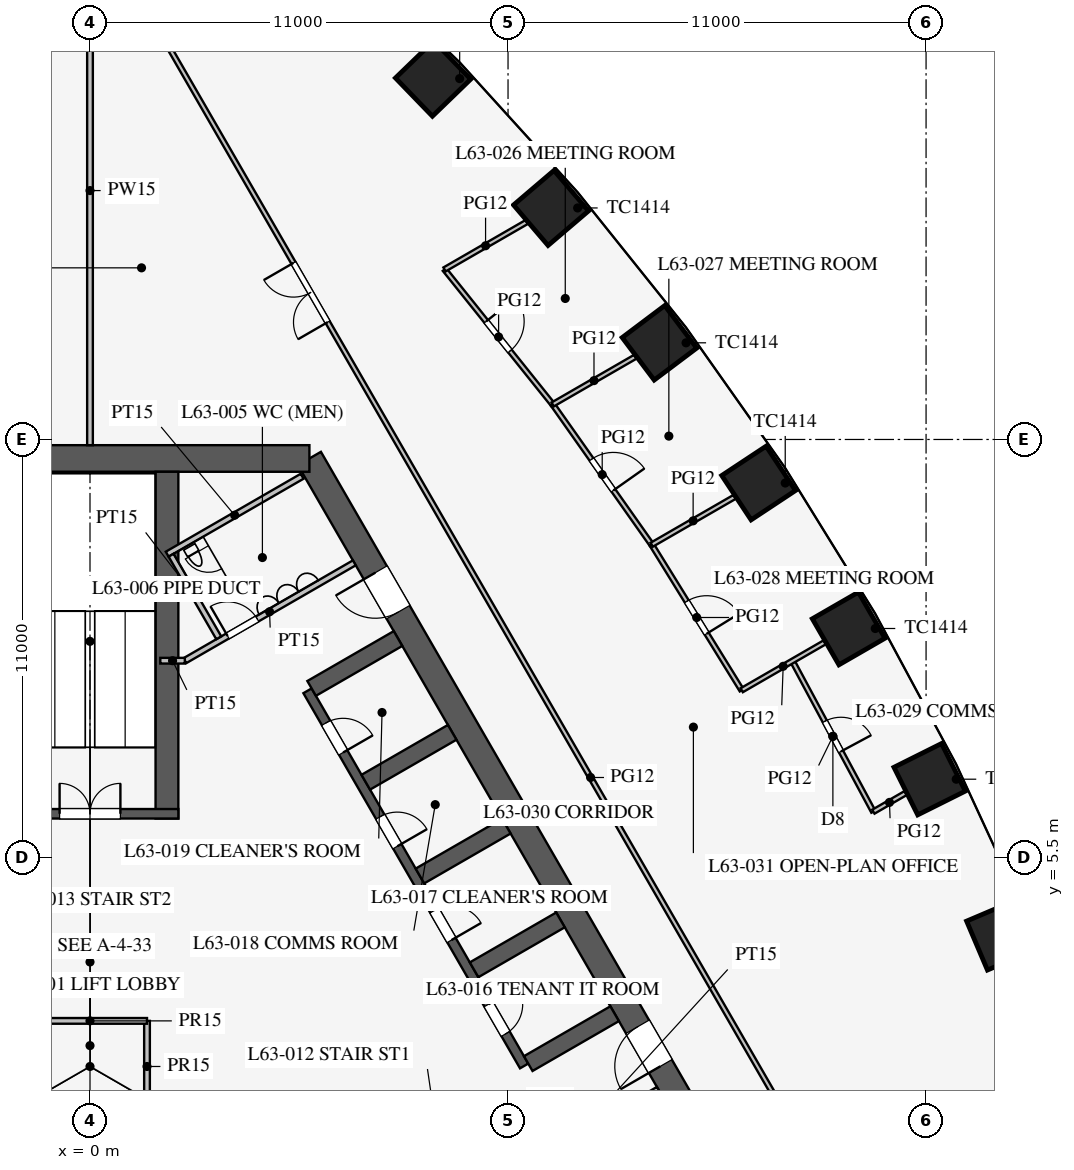
"""IFC4 building model, lengths in metres.
Left out: names, types, materials, properties, quantities, classifications, styles, units other than length and angle.
Written with IfcOpenShell. Run it as: python <this file> out.ifc"""

import sys

from ifc_helpers import new_model, si_unit, direction, frame, frame_2d, origin, origin_2d, place, context, subcontext, project, spatial, rectangle, extrude, element, fill, save


model = new_model("IFC4")
c1 = context("Model", 3, precision=1e-05, world=origin(), true_north=direction((0.0, 1.0)))
c2 = subcontext(c1, "Body", "Model", "MODEL_VIEW")
j1 = project(units=[si_unit("LENGTHUNIT", "METRE"), si_unit("PLANEANGLEUNIT", "RADIAN")], contexts=[c1])
p1 = place(None, origin())
s1 = spatial("IfcSite", under=j1, at=p1, CompositionType="ELEMENT")
p2 = place(p1, origin())
s2 = spatial("IfcBuilding", under=s1, at=p2, CompositionType="ELEMENT")
p3 = place(p2, frame((0.0, 0.0, 276.3)))
s3 = spatial("IfcBuildingStorey", under=s2, at=p3, CompositionType="ELEMENT", Elevation=276.3)
for number, where, z_axis, x_axis in (
    (1, (23.985, 3.455, 0.0), (0.0, 0.0, 1.0), (-0.391, 0.92, 0.0)),
    (2, (22.094, 7.56, 0.0), (0.0, 0.0, 1.0), (-0.447, 0.895, 0.0)),
    (3, (19.963, 11.526, 0.0), (0.0, 0.0, 1.0), (-0.5, 0.866, 0.0)),
    (4, (17.594, 15.354, 0.0), (0.0, 0.0, 1.0), (-0.552, 0.834, 0.0)),
    (5, (14.985, 19.044, 0.0), (0.0, 0.0, 1.0), (-0.601, 0.799, 0.0)),
    (6, (12.132, 22.593, 0.0), (0.0, 0.0, 1.0), (-0.649, 0.761, 0.0)),
    (7, (9.027, 25.997, 0.0), (0.0, 0.0, 1.0), (-0.695, 0.719, 0.0)),
):
    element("IfcColumn", number, at=place(p3, frame(where, z_axis=z_axis, x_axis=x_axis)), inside=s3, PredefinedType="COLUMN", context=c2, shape_type="SweptSolid", body=[
        extrude(rectangle(XDim=1.4, YDim=1.4, at=origin_2d()), origin(), (0.0, 0.0, 1.0), 4.2),
    ])
p4 = place(p3, frame((16.743, -3.0, 0.0), z_axis=(0.0, 0.0, 1.0), x_axis=(-0.500002442456, 0.866023993627, 0.0)))
e8 = element("IfcWall", 8, at=p4, inside=s3, PredefinedType="SHEAR", context=c2, shape_type="SweptSolid", body=[
    extrude(rectangle(XDim=21.939, YDim=0.7, at=frame_2d((10.97, 0.0))), origin(), (0.0, 0.0, 1.0), 4.2),
])
p5 = place(p4, frame((17.27, 0.0, 0.0)))
e9 = element("IfcOpeningElement", 9, at=p5, cuts=e8, PredefinedType="OPENING", context=c2, shape_type="SweptSolid", body=[
    extrude(rectangle(XDim=1.2, YDim=2.1, at=frame_2d((0.6, 1.05))), frame((0.0, 0.36, 0.0), z_axis=(0.0, -1.0, 0.0), x_axis=(1.0, 0.0, 0.0)), (0.0, 0.0, 1.0), 0.72),
])
p6 = place(p4, frame((3.47, 0.0, 0.0)))
e10 = element("IfcOpeningElement", 10, at=p6, cuts=e8, PredefinedType="OPENING", context=c2, shape_type="SweptSolid", body=[
    extrude(rectangle(XDim=1.2, YDim=2.1, at=frame_2d((0.6, 1.05))), frame((0.0, 0.36, 0.0), z_axis=(0.0, -1.0, 0.0), x_axis=(1.0, 0.0, 0.0)), (0.0, 0.0, 1.0), 0.72),
])
p7 = place(p3, frame((5.773, 16.0, 0.0), z_axis=(0.0, 0.0, 1.0), x_axis=(-1.0, 0.0, 0.0)))
e11 = element("IfcWall", 11, at=p7, inside=s3, PredefinedType="SHEAR", context=c2, shape_type="SweptSolid", body=[
    extrude(rectangle(XDim=11.547, YDim=0.7, at=frame_2d((5.773, 0.0))), origin(), (0.0, 0.0, 1.0), 4.2),
])
p8 = place(p3, frame((11.424, 0.014, 0.0), z_axis=(0.0, 0.0, 1.0), x_axis=(-0.500001763848, 0.866024385424, 0.0)))
e12 = element("IfcWall", 12, at=p8, inside=s3, PredefinedType="SHEAR", context=c2, shape_type="SweptSolid", body=[
    extrude(rectangle(XDim=11.4, YDim=0.25, at=frame_2d((5.7, 0.0))), origin(), (0.0, 0.0, 1.0), 4.2),
])
p9 = place(p8, frame((0.975, 0.0, 0.0)))
e13 = element("IfcOpeningElement", 13, at=p9, cuts=e12, PredefinedType="OPENING", context=c2, shape_type="SweptSolid", body=[
    extrude(rectangle(XDim=0.9, YDim=2.1, at=frame_2d((0.45, 1.05))), frame((0.0, 0.135, 0.0), z_axis=(0.0, -1.0, 0.0), x_axis=(1.0, 0.0, 0.0)), (0.0, 0.0, 1.0), 0.27),
])
p10 = place(p8, frame((3.825, 0.0, 0.0)))
e14 = element("IfcOpeningElement", 14, at=p10, cuts=e12, PredefinedType="OPENING", context=c2, shape_type="SweptSolid", body=[
    extrude(rectangle(XDim=0.9, YDim=2.1, at=frame_2d((0.45, 1.05))), frame((0.0, 0.135, 0.0), z_axis=(0.0, -1.0, 0.0), x_axis=(1.0, 0.0, 0.0)), (0.0, 0.0, 1.0), 0.27),
])
p11 = place(p8, frame((6.675, 0.0, 0.0)))
e15 = element("IfcOpeningElement", 15, at=p11, cuts=e12, PredefinedType="OPENING", context=c2, shape_type="SweptSolid", body=[
    extrude(rectangle(XDim=0.9, YDim=2.1, at=frame_2d((0.45, 1.05))), frame((0.0, 0.135, 0.0), z_axis=(0.0, -1.0, 0.0), x_axis=(1.0, 0.0, 0.0)), (0.0, 0.0, 1.0), 0.27),
])
p12 = place(p8, frame((9.525, 0.0, 0.0)))
e16 = element("IfcOpeningElement", 16, at=p12, cuts=e12, PredefinedType="OPENING", context=c2, shape_type="SweptSolid", body=[
    extrude(rectangle(XDim=0.9, YDim=2.1, at=frame_2d((0.45, 1.05))), frame((0.0, 0.135, 0.0), z_axis=(0.0, -1.0, 0.0), x_axis=(1.0, 0.0, 0.0)), (0.0, 0.0, 1.0), 0.27),
])
for number, where, z_axis, x_axis in (
    (17, (11.532, 0.076, 0.0), (0.0, 0.0, 1.0), (0.866, 0.5, 0.0)),
    (18, (10.107, 2.544, 0.0), (0.0, 0.0, 1.0), (0.866, 0.5, 0.0)),
    (19, (8.682, 5.012, 0.0), (0.0, 0.0, 1.0), (0.866, 0.5, 0.0)),
    (20, (7.257, 7.481, 0.0), (0.0, 0.0, 1.0), (0.866, 0.5, 0.0)),
    (21, (5.832, 9.949, 0.0), (0.0, 0.0, 1.0), (0.866, 0.5, 0.0)),
):
    element("IfcWall", number, at=place(p3, frame(where, z_axis=z_axis, x_axis=x_axis)), inside=s3, PredefinedType="SHEAR", context=c2, shape_type="SweptSolid", body=[
        extrude(rectangle(XDim=2.625, YDim=0.45, at=frame_2d((1.312, 0.0))), origin(), (0.0, 0.0, 1.0), 4.2),
    ])
p13 = place(p3, frame((2.025, 6.525, 0.0), z_axis=(0.0, 0.0, 1.0), x_axis=(0.0, 1.0, 0.0)))
e22 = element("IfcWall", 22, at=p13, inside=s3, PredefinedType="SHEAR", context=c2, shape_type="SweptSolid", body=[
    extrude(rectangle(XDim=9.125, YDim=0.6, at=frame_2d((4.562, 0.0))), origin(), (0.0, 0.0, 1.0), 4.2),
])
p14 = place(p3, frame((2.325, 6.65, 0.0), z_axis=(0.0, 0.0, 1.0), x_axis=(-1.0, 0.0, 0.0)))
e23 = element("IfcWall", 23, at=p14, inside=s3, PredefinedType="SHEAR", context=c2, shape_type="SweptSolid", body=[
    extrude(rectangle(XDim=4.65, YDim=0.25, at=frame_2d((2.325, 0.0))), origin(), (0.0, 0.0, 1.0), 4.2),
])
p15 = place(p14, frame((1.525, 0.0, 0.0)))
e24 = element("IfcOpeningElement", 24, at=p15, cuts=e23, PredefinedType="OPENING", context=c2, shape_type="SweptSolid", body=[
    extrude(rectangle(XDim=1.6, YDim=2.1, at=frame_2d((0.8, 1.05))), frame((0.0, 0.135, 0.0), z_axis=(0.0, -1.0, 0.0), x_axis=(1.0, 0.0, 0.0)), (0.0, 0.0, 1.0), 0.27),
])
p16 = place(p3, frame((2.495, 10.678, 0.0), z_axis=(0.0, 0.0, 1.0), x_axis=(0.866037967349, 0.499978238636, 0.0)))
e25 = element("IfcWall", 25, at=p16, inside=s3, PredefinedType="PARTITIONING", context=c2, shape_type="SweptSolid", body=[
    extrude(rectangle(XDim=5.15, YDim=0.15, at=frame_2d((2.575, 0.0))), origin(), (0.0, 0.0, 1.0), 4.0),
])
p17 = place(p16, frame((1.3, 0.0, 0.0)))
e26 = element("IfcOpeningElement", 26, at=p17, cuts=e25, PredefinedType="OPENING", context=c2, shape_type="SweptSolid", body=[
    extrude(rectangle(XDim=0.9, YDim=2.1, at=frame_2d((0.45, 1.05))), frame((0.0, 0.085, 0.0), z_axis=(0.0, -1.0, 0.0), x_axis=(1.0, 0.0, 0.0)), (0.0, 0.0, 1.0), 0.17),
])
p18 = place(p3, frame((10.495, -3.178, 0.0), z_axis=(0.0, 0.0, 1.0), x_axis=(0.866037967349, 0.499978238636, 0.0)))
e27 = element("IfcWall", 27, at=p18, inside=s3, PredefinedType="PARTITIONING", context=c2, shape_type="SweptSolid", body=[
    extrude(rectangle(XDim=5.15, YDim=0.15, at=frame_2d((2.575, 0.0))), origin(), (0.0, 0.0, 1.0), 4.0),
])
p19 = place(p18, frame((2.6, 0.0, 0.0)))
e28 = element("IfcOpeningElement", 28, at=p19, cuts=e27, PredefinedType="OPENING", context=c2, shape_type="SweptSolid", body=[
    extrude(rectangle(XDim=0.9, YDim=2.1, at=frame_2d((0.45, 1.05))), frame((0.0, 0.085, 0.0), z_axis=(0.0, -1.0, 0.0), x_axis=(1.0, 0.0, 0.0)), (0.0, 0.0, 1.0), 0.17),
])
p20 = place(p3, frame((2.495, 10.678, 0.0), z_axis=(0.0, 0.0, 1.0), x_axis=(-1.0, 0.0, 0.0)))
e29 = element("IfcWall", 29, at=p20, inside=s3, PredefinedType="PARTITIONING", context=c2, shape_type="SweptSolid", body=[
    extrude(rectangle(XDim=0.645, YDim=0.15, at=frame_2d((0.323, 0.0))), origin(), (0.0, 0.0, 1.0), 4.0),
])
p21 = place(p3, frame((2.031, 13.482, 0.0), z_axis=(0.0, 0.0, 1.0), x_axis=(0.866050731258, 0.499956128963, 0.0)))
e30 = element("IfcWall", 30, at=p21, inside=s3, PredefinedType="PARTITIONING", context=c2, shape_type="SweptSolid", body=[
    extrude(rectangle(XDim=4.1, YDim=0.15, at=frame_2d((2.05, 0.0))), origin(), (0.0, 0.0, 1.0), 4.0),
])
p22 = place(p3, frame((3.389, 11.281, 0.0), z_axis=(0.0, 0.0, 1.0), x_axis=(-0.499989096993, 0.866031698547, 0.0)))
e31 = element("IfcWall", 31, at=p22, inside=s3, PredefinedType="PARTITIONING", context=c2, shape_type="SweptSolid", body=[
    extrude(rectangle(XDim=2.51, YDim=0.15, at=frame_2d((1.255, 0.0))), origin(), (0.0, 0.0, 1.0), 4.0),
])
p23 = place(p3, frame((1.5, -1.2, 0.0), z_axis=(0.0, 0.0, 1.0), x_axis=(0.0, 1.0, 0.0)))
e32 = element("IfcWall", 32, at=p23, inside=s3, PredefinedType="PARTITIONING", context=c2, shape_type="SweptSolid", body=[
    extrude(rectangle(XDim=2.4, YDim=0.15, at=frame_2d((1.2, 0.0))), origin(), (0.0, 0.0, 1.0), 4.0),
])
p24 = place(p3, frame((1.5, 1.2, 0.0), z_axis=(0.0, 0.0, 1.0), x_axis=(-1.0, 0.0, 0.0)))
e33 = element("IfcWall", 33, at=p24, inside=s3, PredefinedType="PARTITIONING", context=c2, shape_type="SweptSolid", body=[
    extrude(rectangle(XDim=3.0, YDim=0.15, at=frame_2d((1.5, 0.0))), origin(), (0.0, 0.0, 1.0), 4.0),
])
p25 = place(p3, frame((0.0, 16.35, 0.0), z_axis=(0.0, 0.0, 1.0), x_axis=(0.0, 1.0, 0.0)))
e34 = element("IfcWall", 34, at=p25, inside=s3, PredefinedType="PARTITIONING", context=c2, shape_type="SweptSolid", body=[
    extrude(rectangle(XDim=13.4, YDim=0.15, at=frame_2d((6.7, 0.0))), origin(), (0.0, 0.0, 1.0), 2.5),
])
p26 = place(p3, frame((25.854, -14.361, 0.0), z_axis=(0.0, 0.0, 1.0), x_axis=(-0.499999496503, 0.866025694478, 0.0)))
e35 = element("IfcWall", 35, at=p26, inside=s3, PredefinedType="PARTITIONING", context=c2, shape_type="SweptSolid", body=[
    extrude(rectangle(XDim=50.728, YDim=0.12, at=frame_2d((25.364, 0.0))), origin(), (0.0, 0.0, 1.0), 2.9),
])
p27 = place(p26, frame((9.75, 0.0, 0.15)))
e36 = element("IfcOpeningElement", 36, at=p27, cuts=e35, PredefinedType="OPENING", context=c2, shape_type="SweptSolid", body=[
    extrude(rectangle(XDim=1.8, YDim=2.1, at=frame_2d((0.9, 1.05))), frame((0.0, 0.07, 0.0), z_axis=(0.0, -1.0, 0.0), x_axis=(1.0, 0.0, 0.0)), (0.0, 0.0, 1.0), 0.14),
])
p28 = place(p26, frame((39.2, 0.0, 0.15)))
e37 = element("IfcOpeningElement", 37, at=p28, cuts=e35, PredefinedType="OPENING", context=c2, shape_type="SweptSolid", body=[
    extrude(rectangle(XDim=1.8, YDim=2.1, at=frame_2d((0.9, 1.05))), frame((0.0, 0.07, 0.0), z_axis=(0.0, -1.0, 0.0), x_axis=(1.0, 0.0, 0.0)), (0.0, 0.0, 1.0), 0.14),
])
p29 = place(p3, frame((17.149, 9.901, 0.0), z_axis=(0.0, 0.0, 1.0), x_axis=(-0.525981173851, 0.850496210899, 0.0)))
e38 = element("IfcWall", 38, at=p29, inside=s3, PredefinedType="PARTITIONING", context=c2, shape_type="SweptSolid", body=[
    extrude(rectangle(XDim=4.502, YDim=0.12, at=frame_2d((2.251, 0.0))), origin(), (0.0, 0.0, 1.0), 2.9),
])
p30 = place(p29, frame((1.75, 0.0, 0.15)))
e39 = element("IfcOpeningElement", 39, at=p30, cuts=e38, PredefinedType="OPENING", context=c2, shape_type="SweptSolid", body=[
    extrude(rectangle(XDim=1.0, YDim=2.1, at=frame_2d((0.5, 1.05))), frame((0.0, 0.07, 0.0), z_axis=(0.0, -1.0, 0.0), x_axis=(1.0, 0.0, 0.0)), (0.0, 0.0, 1.0), 0.14),
])
p31 = place(p3, frame((14.781, 13.73, 0.0), z_axis=(0.0, 0.0, 1.0), x_axis=(-0.576572893039, 0.817045714151, 0.0)))
e40 = element("IfcWall", 40, at=p31, inside=s3, PredefinedType="PARTITIONING", context=c2, shape_type="SweptSolid", body=[
    extrude(rectangle(XDim=4.519, YDim=0.12, at=frame_2d((2.259, 0.0))), origin(), (0.0, 0.0, 1.0), 2.9),
])
p32 = place(p31, frame((1.75, 0.0, 0.15)))
e41 = element("IfcOpeningElement", 41, at=p32, cuts=e40, PredefinedType="OPENING", context=c2, shape_type="SweptSolid", body=[
    extrude(rectangle(XDim=1.0, YDim=2.1, at=frame_2d((0.5, 1.05))), frame((0.0, 0.07, 0.0), z_axis=(0.0, -1.0, 0.0), x_axis=(1.0, 0.0, 0.0)), (0.0, 0.0, 1.0), 0.14),
])
p33 = place(p3, frame((12.175, 17.422, 0.0), z_axis=(0.0, 0.0, 1.0), x_axis=(-0.625290045305, 0.780392439252, 0.0)))
e42 = element("IfcWall", 42, at=p33, inside=s3, PredefinedType="PARTITIONING", context=c2, shape_type="SweptSolid", body=[
    extrude(rectangle(XDim=4.552, YDim=0.12, at=frame_2d((2.276, 0.0))), origin(), (0.0, 0.0, 1.0), 2.9),
])
p34 = place(p33, frame((1.8, 0.0, 0.15)))
e43 = element("IfcOpeningElement", 43, at=p34, cuts=e42, PredefinedType="OPENING", context=c2, shape_type="SweptSolid", body=[
    extrude(rectangle(XDim=1.0, YDim=2.1, at=frame_2d((0.5, 1.05))), frame((0.0, 0.07, 0.0), z_axis=(0.0, -1.0, 0.0), x_axis=(1.0, 0.0, 0.0)), (0.0, 0.0, 1.0), 0.14),
])
p35 = place(p3, frame((20.614, 6.705, 0.0), z_axis=(0.0, 0.0, 1.0), x_axis=(-0.473566170147, 0.880758242932, 0.0)))
e44 = element("IfcWall", 44, at=p35, inside=s3, PredefinedType="PARTITIONING", context=c2, shape_type="SweptSolid", body=[
    extrude(rectangle(XDim=4.502, YDim=0.12, at=frame_2d((2.251, 0.0))), origin(), (0.0, 0.0, 1.0), 2.9),
])
p36 = place(p35, frame((1.8, 0.0, 0.15)))
e45 = element("IfcOpeningElement", 45, at=p36, cuts=e44, PredefinedType="OPENING", context=c2, shape_type="SweptSolid", body=[
    extrude(rectangle(XDim=0.9, YDim=2.1, at=frame_2d((0.45, 1.05))), frame((0.0, 0.07, 0.0), z_axis=(0.0, -1.0, 0.0), x_axis=(1.0, 0.0, 0.0)), (0.0, 0.0, 1.0), 0.14),
])
p37 = place(p3, frame((17.149, 9.901, 0.0), z_axis=(0.0, 0.0, 1.0), x_axis=(0.866022637375, 0.500004791531, 0.0)))
e46 = element("IfcWall", 46, at=p37, inside=s3, PredefinedType="PARTITIONING", context=c2, shape_type="SweptSolid", body=[
    extrude(rectangle(XDim=2.52, YDim=0.12, at=frame_2d((1.26, 0.0))), origin(), (0.0, 0.0, 1.0), 2.6),
])
p38 = place(p3, frame((9.329, 20.974, 0.0), z_axis=(0.0, 0.0, 1.0), x_axis=(0.865999769722, 0.50004439687, 0.0)))
e47 = element("IfcWall", 47, at=p38, inside=s3, PredefinedType="PARTITIONING", context=c2, shape_type="SweptSolid", body=[
    extrude(rectangle(XDim=2.494, YDim=0.12, at=frame_2d((1.247, 0.0))), origin(), (0.0, 0.0, 1.0), 2.4),
])
p39 = place(p3, frame((14.781, 13.73, 0.0), z_axis=(0.0, 0.0, 1.0), x_axis=(0.866032146685, 0.499988320771, 0.0)))
e48 = element("IfcWall", 48, at=p39, inside=s3, PredefinedType="PARTITIONING", context=c2, shape_type="SweptSolid", body=[
    extrude(rectangle(XDim=2.517, YDim=0.12, at=frame_2d((1.259, 0.0))), origin(), (0.0, 0.0, 1.0), 2.6),
])
p40 = place(p3, frame((12.175, 17.422, 0.0), z_axis=(0.0, 0.0, 1.0), x_axis=(0.866085123457, 0.499896548224, 0.0)))
e49 = element("IfcWall", 49, at=p40, inside=s3, PredefinedType="PARTITIONING", context=c2, shape_type="SweptSolid", body=[
    extrude(rectangle(XDim=2.509, YDim=0.12, at=frame_2d((1.254, 0.0))), origin(), (0.0, 0.0, 1.0), 2.6),
])
p41 = place(p3, frame((20.614, 6.705, 0.0), z_axis=(0.0, 0.0, 1.0), x_axis=(0.866069217599, 0.499924104568, 0.0)))
e50 = element("IfcWall", 50, at=p41, inside=s3, PredefinedType="PARTITIONING", context=c2, shape_type="SweptSolid", body=[
    extrude(rectangle(XDim=0.978, YDim=0.12, at=frame_2d((0.489, 0.0))), origin(), (0.0, 0.0, 1.0), 2.6),
])
p42 = place(p17, origin())
e51 = element("IfcDoor", 51, at=p42, inside=s3, OperationType="SINGLE_SWING_LEFT", PredefinedType="DOOR", context=c2, shape_type="SweptSolid", body=[
    extrude(rectangle(XDim=0.9, YDim=2.1, at=frame_2d((0.45, 1.05))), frame((0.0, 0.025, 0.0), z_axis=(0.0, -1.0, 0.0), x_axis=(1.0, 0.0, 0.0)), (0.0, 0.0, 1.0), 0.05),
])
fill(e26, e51)
p43 = place(p15, frame((1.6, 0.0, 0.0), z_axis=(0.0, 0.0, 1.0), x_axis=(-1.0, 0.0, 0.0)))
e52 = element("IfcDoor", 52, at=p43, inside=s3, OperationType="DOUBLE_DOOR_SINGLE_SWING", PredefinedType="DOOR", context=c2, shape_type="SweptSolid", body=[
    extrude(rectangle(XDim=1.6, YDim=2.1, at=frame_2d((0.8, 1.05))), frame((0.0, 0.025, 0.0), z_axis=(0.0, -1.0, 0.0), x_axis=(1.0, 0.0, 0.0)), (0.0, 0.0, 1.0), 0.05),
])
fill(e24, e52)
p44 = place(p5, origin())
e53 = element("IfcDoor", 53, at=p44, inside=s3, OperationType="SINGLE_SWING_RIGHT", PredefinedType="DOOR", context=c2, shape_type="SweptSolid", body=[
    extrude(rectangle(XDim=1.2, YDim=2.1, at=frame_2d((0.6, 1.05))), frame((0.0, 0.025, 0.0), z_axis=(0.0, -1.0, 0.0), x_axis=(1.0, 0.0, 0.0)), (0.0, 0.0, 1.0), 0.05),
])
fill(e9, e53)
p45 = place(p6, origin())
e54 = element("IfcDoor", 54, at=p45, inside=s3, OperationType="SINGLE_SWING_LEFT", PredefinedType="DOOR", context=c2, shape_type="SweptSolid", body=[
    extrude(rectangle(XDim=1.2, YDim=2.1, at=frame_2d((0.6, 1.05))), frame((0.0, 0.025, 0.0), z_axis=(0.0, -1.0, 0.0), x_axis=(1.0, 0.0, 0.0)), (0.0, 0.0, 1.0), 0.05),
])
fill(e10, e54)
p46 = place(p9, frame((0.9, 0.0, 0.0), z_axis=(0.0, 0.0, 1.0), x_axis=(-1.0, 0.0, 0.0)))
e55 = element("IfcDoor", 55, at=p46, inside=s3, OperationType="SINGLE_SWING_LEFT", PredefinedType="DOOR", context=c2, shape_type="SweptSolid", body=[
    extrude(rectangle(XDim=0.9, YDim=2.1, at=frame_2d((0.45, 1.05))), frame((0.0, 0.025, 0.0), z_axis=(0.0, -1.0, 0.0), x_axis=(1.0, 0.0, 0.0)), (0.0, 0.0, 1.0), 0.05),
])
fill(e13, e55)
p47 = place(p10, frame((0.9, 0.0, 0.0), z_axis=(0.0, 0.0, 1.0), x_axis=(-1.0, 0.0, 0.0)))
e56 = element("IfcDoor", 56, at=p47, inside=s3, OperationType="SINGLE_SWING_RIGHT", PredefinedType="DOOR", context=c2, shape_type="SweptSolid", body=[
    extrude(rectangle(XDim=0.9, YDim=2.1, at=frame_2d((0.45, 1.05))), frame((0.0, 0.025, 0.0), z_axis=(0.0, -1.0, 0.0), x_axis=(1.0, 0.0, 0.0)), (0.0, 0.0, 1.0), 0.05),
])
fill(e14, e56)
p48 = place(p11, frame((0.9, 0.0, 0.0), z_axis=(0.0, 0.0, 1.0), x_axis=(-1.0, 0.0, 0.0)))
e57 = element("IfcDoor", 57, at=p48, inside=s3, OperationType="SINGLE_SWING_RIGHT", PredefinedType="DOOR", context=c2, shape_type="SweptSolid", body=[
    extrude(rectangle(XDim=0.9, YDim=2.1, at=frame_2d((0.45, 1.05))), frame((0.0, 0.025, 0.0), z_axis=(0.0, -1.0, 0.0), x_axis=(1.0, 0.0, 0.0)), (0.0, 0.0, 1.0), 0.05),
])
fill(e15, e57)
p49 = place(p12, frame((0.9, 0.0, 0.0), z_axis=(0.0, 0.0, 1.0), x_axis=(-1.0, 0.0, 0.0)))
e58 = element("IfcDoor", 58, at=p49, inside=s3, OperationType="SINGLE_SWING_RIGHT", PredefinedType="DOOR", context=c2, shape_type="SweptSolid", body=[
    extrude(rectangle(XDim=0.9, YDim=2.1, at=frame_2d((0.45, 1.05))), frame((0.0, 0.025, 0.0), z_axis=(0.0, -1.0, 0.0), x_axis=(1.0, 0.0, 0.0)), (0.0, 0.0, 1.0), 0.05),
])
fill(e16, e58)
p50 = place(p34, frame((1.0, 0.0, 0.0), z_axis=(0.0, 0.0, 1.0), x_axis=(-1.0, 0.0, 0.0)))
e59 = element("IfcDoor", 59, at=p50, inside=s3, OperationType="SINGLE_SWING_LEFT", PredefinedType="DOOR", context=c2, shape_type="SweptSolid", body=[
    extrude(rectangle(XDim=1.0, YDim=2.1, at=frame_2d((0.5, 1.05))), frame((0.0, 0.025, 0.0), z_axis=(0.0, -1.0, 0.0), x_axis=(1.0, 0.0, 0.0)), (0.0, 0.0, 1.0), 0.05),
])
fill(e43, e59)
p51 = place(p32, frame((1.0, 0.0, 0.0), z_axis=(0.0, 0.0, 1.0), x_axis=(-1.0, 0.0, 0.0)))
e60 = element("IfcDoor", 60, at=p51, inside=s3, OperationType="SINGLE_SWING_RIGHT", PredefinedType="DOOR", context=c2, shape_type="SweptSolid", body=[
    extrude(rectangle(XDim=1.0, YDim=2.1, at=frame_2d((0.5, 1.05))), frame((0.0, 0.025, 0.0), z_axis=(0.0, -1.0, 0.0), x_axis=(1.0, 0.0, 0.0)), (0.0, 0.0, 1.0), 0.05),
])
fill(e41, e60)
p52 = place(p30, frame((1.0, 0.0, 0.0), z_axis=(0.0, 0.0, 1.0), x_axis=(-1.0, 0.0, 0.0)))
e61 = element("IfcDoor", 61, at=p52, inside=s3, OperationType="SINGLE_SWING_RIGHT", PredefinedType="DOOR", context=c2, shape_type="SweptSolid", body=[
    extrude(rectangle(XDim=1.0, YDim=2.1, at=frame_2d((0.5, 1.05))), frame((0.0, 0.025, 0.0), z_axis=(0.0, -1.0, 0.0), x_axis=(1.0, 0.0, 0.0)), (0.0, 0.0, 1.0), 0.05),
])
fill(e39, e61)
p53 = place(p36, frame((0.9, 0.0, 0.0), z_axis=(0.0, 0.0, 1.0), x_axis=(-1.0, 0.0, 0.0)))
e62 = element("IfcDoor", 62, at=p53, inside=s3, OperationType="SINGLE_SWING_RIGHT", PredefinedType="DOOR", context=c2, shape_type="SweptSolid", body=[
    extrude(rectangle(XDim=0.9, YDim=2.1, at=frame_2d((0.45, 1.05))), frame((0.0, 0.025, 0.0), z_axis=(0.0, -1.0, 0.0), x_axis=(1.0, 0.0, 0.0)), (0.0, 0.0, 1.0), 0.05),
])
fill(e45, e62)
p54 = place(p28, origin())
e63 = element("IfcDoor", 63, at=p54, inside=s3, OperationType="DOUBLE_DOOR_SINGLE_SWING", PredefinedType="DOOR", context=c2, shape_type="SweptSolid", body=[
    extrude(rectangle(XDim=1.8, YDim=2.1, at=frame_2d((0.9, 1.05))), frame((0.0, 0.025, 0.0), z_axis=(0.0, -1.0, 0.0), x_axis=(1.0, 0.0, 0.0)), (0.0, 0.0, 1.0), 0.05),
])
fill(e37, e63)
save(model, sys.argv[1])
